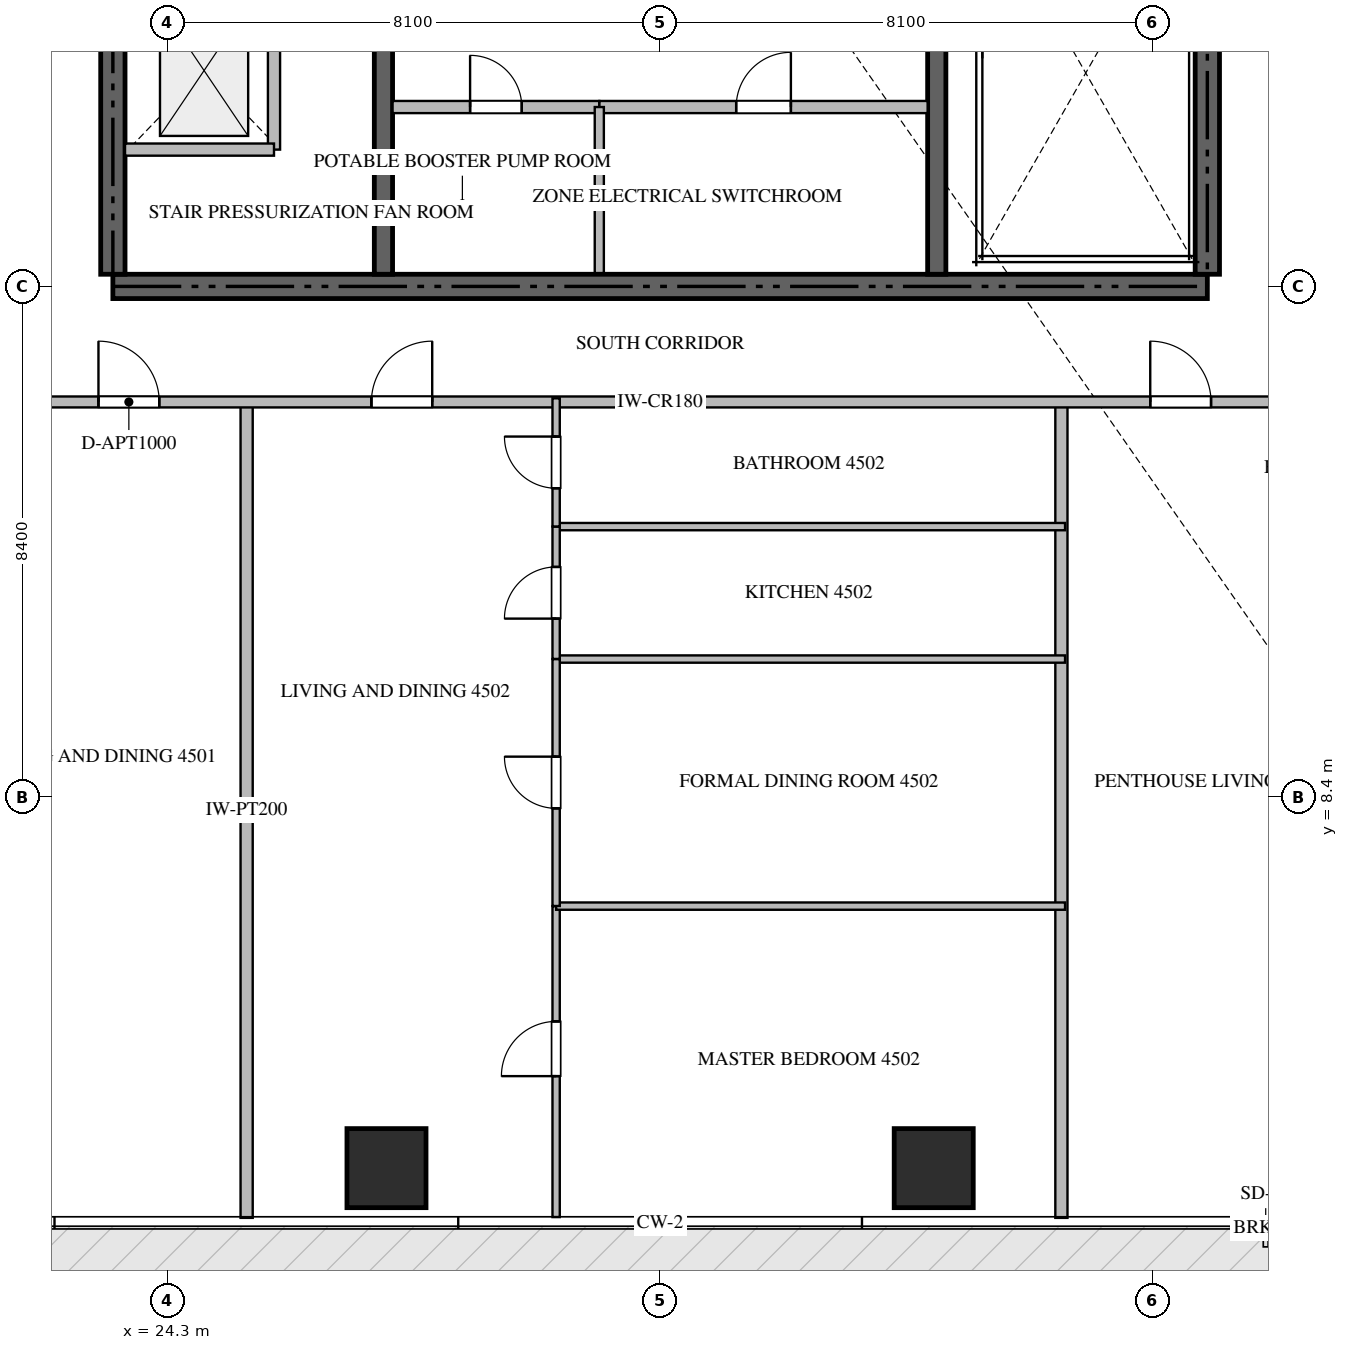
"""IFC4 building model, lengths in metres.
Left out: names, types, materials, properties, quantities, classifications, styles, units other than length and angle.
Written with IfcOpenShell. Run it as: python <this file> out.ifc"""

import sys

from ifc_helpers import new_model, si_unit, direction, frame, frame_2d, origin, origin_2d, place, context, subcontext, project, spatial, rectangle, extrude, source, transform, mapped, element, fill, save


model = new_model("IFC4")
c1 = context("Model", 3, precision=1e-05, world=origin(), true_north=direction((0.0, 1.0)))
c2 = subcontext(c1, "Body", "Model", "MODEL_VIEW")
j1 = project(units=[si_unit("LENGTHUNIT", "METRE"), si_unit("PLANEANGLEUNIT", "RADIAN")], contexts=[c1])
p1 = place(None, origin())
s1 = spatial("IfcSite", under=j1, at=p1, CompositionType="ELEMENT")
p2 = place(p1, origin())
s2 = spatial("IfcBuilding", under=s1, at=p2, CompositionType="ELEMENT")
p3 = place(p2, frame((0.0, 0.0, 180.15)))
s3 = spatial("IfcBuildingStorey", under=s2, at=p3, CompositionType="ELEMENT", Elevation=180.15)
p4 = place(p3, frame((23.4, 16.8, -0.26), z_axis=(0.0, 0.0, 1.0), x_axis=(1.0, 0.0, 0.0)))
e1 = element("IfcWall", 1, at=p4, inside=s3, PredefinedType="SHEAR", context=c2, shape_type="SweptSolid", body=[
    extrude(rectangle(XDim=18.0, YDim=0.4, at=frame_2d((9.0, 0.0))), origin(), (0.0, 0.0, 1.0), 3.748),
])
p5 = place(p3, frame((23.4, 17.0, -0.26), z_axis=(0.0, 0.0, 1.0), x_axis=(0.0, 1.0, 0.0)))
e2 = element("IfcWall", 2, at=p5, inside=s3, PredefinedType="SHEAR", context=c2, shape_type="SweptSolid", body=[
    extrude(rectangle(XDim=4.85, YDim=0.4, at=frame_2d((2.425, 0.0))), origin(), (0.0, 0.0, 1.0), 3.748),
])
p6 = place(p3, frame((41.4, 17.0, -0.26), z_axis=(0.0, 0.0, 1.0), x_axis=(0.0, 1.0, 0.0)))
e3 = element("IfcWall", 3, at=p6, inside=s3, PredefinedType="SHEAR", context=c2, shape_type="SweptSolid", body=[
    extrude(rectangle(XDim=8.35, YDim=0.4, at=frame_2d((4.175, 0.0))), origin(), (0.0, 0.0, 1.0), 3.748),
])
p7 = place(p3, frame((27.85, 17.0, -0.26), z_axis=(0.0, 0.0, 1.0), x_axis=(0.0, 1.0, 0.0)))
e4 = element("IfcWall", 4, at=p7, inside=s3, PredefinedType="SHEAR", context=c2, shape_type="SweptSolid", body=[
    extrude(rectangle(XDim=4.85, YDim=0.3, at=frame_2d((2.425, 0.0))), origin(), (0.0, 0.0, 1.0), 3.748),
])
p8 = place(p3, frame((36.95, 17.0, -0.26), z_axis=(0.0, 0.0, 1.0), x_axis=(0.0, 1.0, 0.0)))
e5 = element("IfcWall", 5, at=p8, inside=s3, PredefinedType="SHEAR", context=c2, shape_type="SweptSolid", body=[
    extrude(rectangle(XDim=8.35, YDim=0.3, at=frame_2d((4.175, 0.0))), origin(), (0.0, 0.0, 1.0), 3.748),
])
m1 = source(origin(), c2, "Body", "SweptSolid", [
    extrude(rectangle(XDim=1.3, YDim=1.3, at=origin_2d()), origin(), (0.0, 0.0, 1.0), 3.75),
])
for number, where, z_axis, x_axis in (
    (6, (27.9, 2.3, -0.26), (0.0, 0.0, 1.0), (1.0, 0.0, 0.0)),
    (7, (36.9, 2.3, -0.26), (0.0, 0.0, 1.0), (1.0, 0.0, 0.0)),
):
    element("IfcColumn", number, at=place(p3, frame(where, z_axis=z_axis, x_axis=x_axis)), inside=s3, PredefinedType="COLUMN", context=c2, shape_type="MappedRepresentation", body=[
        mapped(m1, transform((0.0, 0.0, 0.0), scale=1.0)),
    ])
p9 = place(p3, frame((26.05, 19.05, 0.0), z_axis=(0.0, 0.0, 1.0), x_axis=(0.0, 1.0, 0.0)))
e8 = element("IfcWall", 8, at=p9, inside=s3, PredefinedType="STANDARD", context=c2, shape_type="SweptSolid", body=[
    extrude(rectangle(XDim=2.5, YDim=0.2, at=frame_2d((1.25, 0.0))), origin(), (0.0, 0.0, 1.0), 3.49),
])
p10 = place(p3, frame((23.6, 19.05, 0.0), z_axis=(0.0, 0.0, 1.0), x_axis=(1.0, 0.0, 0.0)))
e9 = element("IfcWall", 9, at=p10, inside=s3, PredefinedType="STANDARD", context=c2, shape_type="SweptSolid", body=[
    extrude(rectangle(XDim=2.45, YDim=0.2, at=frame_2d((1.225, 0.0))), origin(), (0.0, 0.0, 1.0), 3.49),
])
p11 = place(p3, frame((28.0, 19.75, 0.0), z_axis=(0.0, 0.0, 1.0), x_axis=(1.0, 0.0, 0.0)))
e10 = element("IfcWall", 10, at=p11, inside=s3, PredefinedType="STANDARD", context=c2, shape_type="SweptSolid", body=[
    extrude(rectangle(XDim=3.4, YDim=0.2, at=frame_2d((1.7, 0.0))), origin(), (0.0, 0.0, 1.0), 3.49),
])
p12 = place(p11, frame((1.275, 0.0, 0.0)))
e11 = element("IfcOpeningElement", 11, at=p12, cuts=e10, PredefinedType="OPENING", context=c2, shape_type="SweptSolid", body=[
    extrude(rectangle(XDim=0.85, YDim=2.1, at=frame_2d((0.425, 1.05))), frame((0.0, 0.11, 0.0), z_axis=(0.0, -1.0, 0.0), x_axis=(1.0, 0.0, 0.0)), (0.0, 0.0, 1.0), 0.22),
])
p13 = place(p3, frame((31.402, 19.75, 0.0), z_axis=(0.0, 0.0, 1.0), x_axis=(1.0, 0.0, 0.0)))
e12 = element("IfcWall", 12, at=p13, inside=s3, PredefinedType="STANDARD", context=c2, shape_type="SweptSolid", body=[
    extrude(rectangle(XDim=5.398, YDim=0.2, at=frame_2d((2.699, 0.0))), origin(), (0.0, 0.0, 1.0), 3.49),
])
p14 = place(p13, frame((2.249, 0.0, 0.0)))
e13 = element("IfcOpeningElement", 13, at=p14, cuts=e12, PredefinedType="OPENING", context=c2, shape_type="SweptSolid", body=[
    extrude(rectangle(XDim=0.9, YDim=2.1, at=frame_2d((0.45, 1.05))), frame((0.0, 0.11, 0.0), z_axis=(0.0, -1.0, 0.0), x_axis=(1.0, 0.0, 0.0)), (0.0, 0.0, 1.0), 0.22),
])
p15 = place(p3, frame((31.4, 17.02, 0.0), z_axis=(0.0, 0.0, 1.0), x_axis=(0.0, 1.0, 0.0)))
e14 = element("IfcWall", 14, at=p15, inside=s3, PredefinedType="PARTITIONING", context=c2, shape_type="SweptSolid", body=[
    extrude(rectangle(XDim=2.73, YDim=0.15, at=frame_2d((1.365, 0.0))), origin(), (0.0, 0.0, 1.0), 3.49),
])
for number, where, z_axis, x_axis in (
    (15, (25.6, 1.482, 0.0), (0.0, 0.0, 1.0), (0.0, 1.0, 0.0)),
    (16, (39.0, 1.482, 0.0), (0.0, 0.0, 1.0), (0.0, 1.0, 0.0)),
):
    element("IfcWall", number, at=place(p3, frame(where, z_axis=z_axis, x_axis=x_axis)), inside=s3, PredefinedType="PARTITIONING", context=c2, shape_type="SweptSolid", body=[
        extrude(rectangle(XDim=13.418, YDim=0.2, at=frame_2d((6.709, 0.0))), origin(), (0.0, 0.0, 1.0), 3.49),
    ])
p16 = place(p3, frame((20.952, 14.9, 0.0), z_axis=(0.0, 0.0, 1.0), x_axis=(1.0, 0.0, 0.0)))
e17 = element("IfcWall", 17, at=p16, inside=s3, PredefinedType="PARTITIONING", context=c2, shape_type="SweptSolid", body=[
    extrude(rectangle(XDim=22.896, YDim=0.18, at=frame_2d((11.448, 0.0))), origin(), (0.0, 0.0, 1.0), 3.49),
])
p17 = place(p16, frame((2.211, 0.0, 0.0)))
e18 = element("IfcOpeningElement", 18, at=p17, cuts=e17, PredefinedType="OPENING", context=c2, shape_type="SweptSolid", body=[
    extrude(rectangle(XDim=1.0, YDim=2.15, at=frame_2d((0.5, 1.075))), frame((0.0, 0.1, 0.0), z_axis=(0.0, -1.0, 0.0), x_axis=(1.0, 0.0, 0.0)), (0.0, 0.0, 1.0), 0.2),
])
p18 = place(p16, frame((6.7, 0.0, 0.0)))
e19 = element("IfcOpeningElement", 19, at=p18, cuts=e17, PredefinedType="OPENING", context=c2, shape_type="SweptSolid", body=[
    extrude(rectangle(XDim=1.0, YDim=2.15, at=frame_2d((0.5, 1.075))), frame((0.0, 0.1, 0.0), z_axis=(0.0, -1.0, 0.0), x_axis=(1.0, 0.0, 0.0)), (0.0, 0.0, 1.0), 0.2),
])
p19 = place(p16, frame((19.509, 0.0, 0.0)))
e20 = element("IfcOpeningElement", 20, at=p19, cuts=e17, PredefinedType="OPENING", context=c2, shape_type="SweptSolid", body=[
    extrude(rectangle(XDim=1.0, YDim=2.15, at=frame_2d((0.5, 1.075))), frame((0.0, 0.1, 0.0), z_axis=(0.0, -1.0, 0.0), x_axis=(1.0, 0.0, 0.0)), (0.0, 0.0, 1.0), 0.2),
])
p20 = place(p3, frame((30.69, 1.495, 0.0), z_axis=(0.0, 0.0, 1.0), x_axis=(0.0, 1.0, 0.0)))
e21 = element("IfcWall", 21, at=p20, inside=s3, PredefinedType="PARTITIONING", context=c2, shape_type="SweptSolid", body=[
    extrude(rectangle(XDim=5.114, YDim=0.12, at=frame_2d((2.557, 0.0))), origin(), (0.0, 0.0, 1.0), 3.49),
])
p21 = place(p20, frame((2.318, 0.0, 0.0)))
e22 = element("IfcOpeningElement", 22, at=p21, cuts=e21, PredefinedType="OPENING", context=c2, shape_type="SweptSolid", body=[
    extrude(rectangle(XDim=0.9, YDim=2.1, at=frame_2d((0.45, 1.05))), frame((0.0, 0.07, 0.0), z_axis=(0.0, -1.0, 0.0), x_axis=(1.0, 0.0, 0.0)), (0.0, 0.0, 1.0), 0.14),
])
for number, where, z_axis, x_axis in (
    (23, (30.69, 6.609, 0.0), (0.0, 0.0, 1.0), (1.0, 0.0, 0.0)),
    (24, (30.69, 10.672, 0.0), (0.0, 0.0, 1.0), (1.0, 0.0, 0.0)),
    (25, (30.69, 12.85, 0.0), (0.0, 0.0, 1.0), (1.0, 0.0, 0.0)),
):
    element("IfcWall", number, at=place(p3, frame(where, z_axis=z_axis, x_axis=x_axis)), inside=s3, PredefinedType="PARTITIONING", context=c2, shape_type="SweptSolid", body=[
        extrude(rectangle(XDim=8.37, YDim=0.12, at=frame_2d((4.185, 0.0))), origin(), (0.0, 0.0, 1.0), 3.49),
    ])
p22 = place(p3, frame((30.69, 6.611, 0.0), z_axis=(0.0, 0.0, 1.0), x_axis=(0.0, 1.0, 0.0)))
e26 = element("IfcWall", 26, at=p22, inside=s3, PredefinedType="PARTITIONING", context=c2, shape_type="SweptSolid", body=[
    extrude(rectangle(XDim=4.061, YDim=0.12, at=frame_2d((2.031, 0.0))), origin(), (0.0, 0.0, 1.0), 3.49),
])
p23 = place(p22, frame((1.606, 0.0, 0.0)))
e27 = element("IfcOpeningElement", 27, at=p23, cuts=e26, PredefinedType="OPENING", context=c2, shape_type="SweptSolid", body=[
    extrude(rectangle(XDim=0.85, YDim=2.1, at=frame_2d((0.425, 1.05))), frame((0.0, 0.07, 0.0), z_axis=(0.0, -1.0, 0.0), x_axis=(1.0, 0.0, 0.0)), (0.0, 0.0, 1.0), 0.14),
])
p24 = place(p3, frame((30.69, 10.674, 0.0), z_axis=(0.0, 0.0, 1.0), x_axis=(0.0, 1.0, 0.0)))
e28 = element("IfcWall", 28, at=p24, inside=s3, PredefinedType="PARTITIONING", context=c2, shape_type="SweptSolid", body=[
    extrude(rectangle(XDim=2.176, YDim=0.12, at=frame_2d((1.088, 0.0))), origin(), (0.0, 0.0, 1.0), 3.49),
])
p25 = place(p24, frame((0.663, 0.0, 0.0)))
e29 = element("IfcOpeningElement", 29, at=p25, cuts=e28, PredefinedType="OPENING", context=c2, shape_type="SweptSolid", body=[
    extrude(rectangle(XDim=0.85, YDim=2.1, at=frame_2d((0.425, 1.05))), frame((0.0, 0.07, 0.0), z_axis=(0.0, -1.0, 0.0), x_axis=(1.0, 0.0, 0.0)), (0.0, 0.0, 1.0), 0.14),
])
p26 = place(p3, frame((30.69, 12.852, 0.0), z_axis=(0.0, 0.0, 1.0), x_axis=(0.0, 1.0, 0.0)))
e30 = element("IfcWall", 30, at=p26, inside=s3, PredefinedType="PARTITIONING", context=c2, shape_type="SweptSolid", body=[
    extrude(rectangle(XDim=2.108, YDim=0.12, at=frame_2d((1.054, 0.0))), origin(), (0.0, 0.0, 1.0), 3.49),
])
p27 = place(p26, frame((0.629, 0.0, 0.0)))
e31 = element("IfcOpeningElement", 31, at=p27, cuts=e30, PredefinedType="OPENING", context=c2, shape_type="SweptSolid", body=[
    extrude(rectangle(XDim=0.85, YDim=2.1, at=frame_2d((0.425, 1.05))), frame((0.0, 0.07, 0.0), z_axis=(0.0, -1.0, 0.0), x_axis=(1.0, 0.0, 0.0)), (0.0, 0.0, 1.0), 0.14),
])
m2 = source(origin(), c2, "Body", "SweptSolid", [
    extrude(rectangle(XDim=0.85, YDim=2.1, at=frame_2d((0.425, 1.05))), frame((0.0, 0.025, 0.0), z_axis=(0.0, -1.0, 0.0), x_axis=(1.0, 0.0, 0.0)), (0.0, 0.0, 1.0), 0.05),
])
p28 = place(p12, origin())
e32 = element("IfcDoor", 32, at=p28, inside=s3, OperationType="SINGLE_SWING_LEFT", PredefinedType="DOOR", context=c2, shape_type="MappedRepresentation", body=[
    mapped(m2, transform((0.0, 0.0, 0.0), scale=1.0)),
])
fill(e11, e32)
m3 = source(origin(), c2, "Body", "SweptSolid", [
    extrude(rectangle(XDim=0.9, YDim=2.1, at=frame_2d((0.45, 1.05))), frame((0.0, 0.025, 0.0), z_axis=(0.0, -1.0, 0.0), x_axis=(1.0, 0.0, 0.0)), (0.0, 0.0, 1.0), 0.05),
])
p29 = place(p14, origin())
e33 = element("IfcDoor", 33, at=p29, inside=s3, OperationType="SINGLE_SWING_RIGHT", PredefinedType="DOOR", context=c2, shape_type="MappedRepresentation", body=[
    mapped(m3, transform((0.0, 0.0, 0.0), scale=1.0)),
])
fill(e13, e33)
m4 = source(origin(), c2, "Body", "SweptSolid", [
    extrude(rectangle(XDim=1.0, YDim=2.15, at=frame_2d((0.5, 1.075))), frame((0.0, 0.025, 0.0), z_axis=(0.0, -1.0, 0.0), x_axis=(1.0, 0.0, 0.0)), (0.0, 0.0, 1.0), 0.05),
])
p30 = place(p17, origin())
e34 = element("IfcDoor", 34, at=p30, inside=s3, OperationType="SINGLE_SWING_LEFT", PredefinedType="DOOR", context=c2, shape_type="MappedRepresentation", body=[
    mapped(m4, transform((0.0, 0.0, 0.0), scale=1.0)),
])
fill(e18, e34)
p31 = place(p18, origin())
e35 = element("IfcDoor", 35, at=p31, inside=s3, OperationType="SINGLE_SWING_RIGHT", PredefinedType="DOOR", context=c2, shape_type="MappedRepresentation", body=[
    mapped(m4, transform((0.0, 0.0, 0.0), scale=1.0)),
])
fill(e19, e35)
p32 = place(p19, origin())
e36 = element("IfcDoor", 36, at=p32, inside=s3, OperationType="SINGLE_SWING_LEFT", PredefinedType="DOOR", context=c2, shape_type="MappedRepresentation", body=[
    mapped(m4, transform((0.0, 0.0, 0.0), scale=1.0)),
])
fill(e20, e36)
p33 = place(p21, origin())
e37 = element("IfcDoor", 37, at=p33, inside=s3, OperationType="SINGLE_SWING_LEFT", PredefinedType="DOOR", context=c2, shape_type="MappedRepresentation", body=[
    mapped(m3, transform((0.0, 0.0, 0.0), scale=1.0)),
])
fill(e22, e37)
p34 = place(p23, origin())
e38 = element("IfcDoor", 38, at=p34, inside=s3, OperationType="SINGLE_SWING_RIGHT", PredefinedType="DOOR", context=c2, shape_type="MappedRepresentation", body=[
    mapped(m2, transform((0.0, 0.0, 0.0), scale=1.0)),
])
fill(e27, e38)
p35 = place(p25, origin())
e39 = element("IfcDoor", 39, at=p35, inside=s3, OperationType="SINGLE_SWING_LEFT", PredefinedType="DOOR", context=c2, shape_type="MappedRepresentation", body=[
    mapped(m2, transform((0.0, 0.0, 0.0), scale=1.0)),
])
fill(e29, e39)
p36 = place(p27, origin())
e40 = element("IfcDoor", 40, at=p36, inside=s3, OperationType="SINGLE_SWING_RIGHT", PredefinedType="DOOR", context=c2, shape_type="MappedRepresentation", body=[
    mapped(m2, transform((0.0, 0.0, 0.0), scale=1.0)),
])
fill(e31, e40)
save(model, sys.argv[1])
